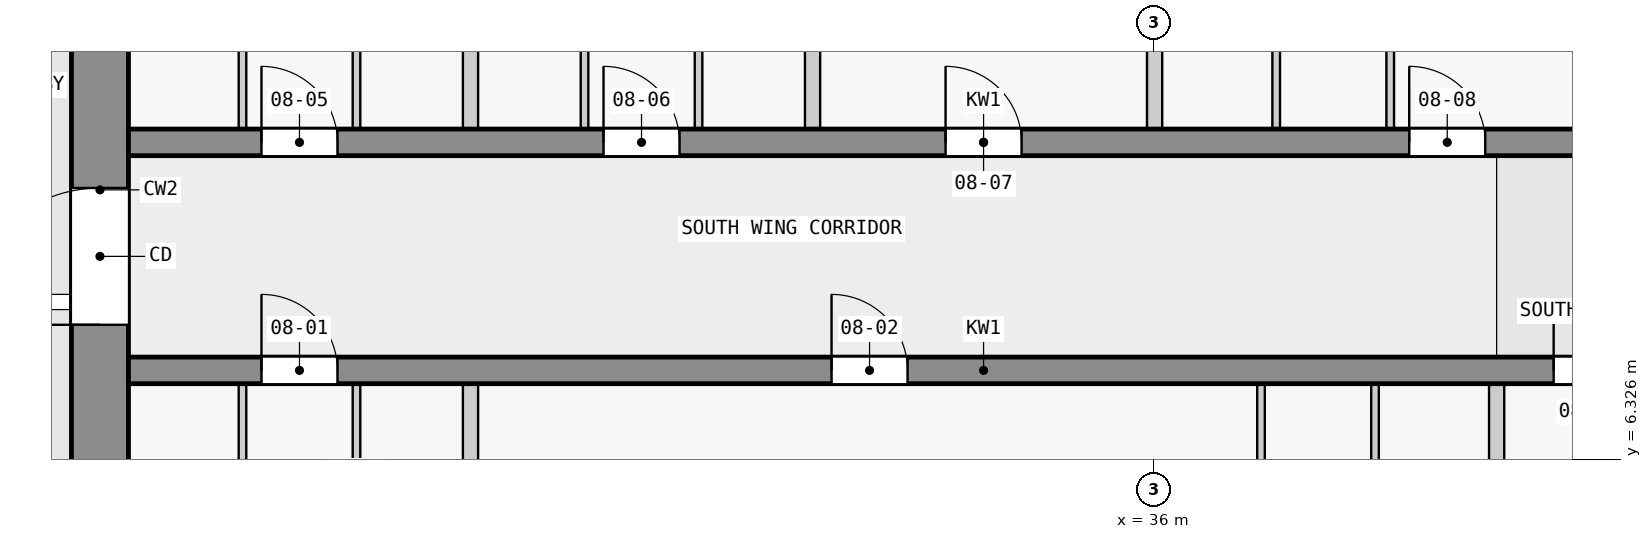
"""IFC4 building model, lengths in metres.
Left out: names, types, materials, properties, quantities, classifications, styles, units other than length and angle.
Written with IfcOpenShell. Run it as: python <this file> out.ifc"""

import sys

from ifc_helpers import new_model, si_unit, direction, frame, frame_2d, origin, place, context, subcontext, project, spatial, rectangle, extrude, element, fill, save


model = new_model("IFC4")
c1 = context("Model", 3, precision=1e-05, world=origin(), true_north=direction((0.0, 1.0)))
c2 = subcontext(c1, "Body", "Model", "MODEL_VIEW")
j1 = project(units=[si_unit("LENGTHUNIT", "METRE"), si_unit("PLANEANGLEUNIT", "RADIAN")], contexts=[c1])
p1 = place(None, origin())
s1 = spatial("IfcSite", under=j1, at=p1, CompositionType="ELEMENT")
p2 = place(p1, origin())
s2 = spatial("IfcBuilding", under=s1, at=p2, CompositionType="ELEMENT")
p3 = place(p2, frame((0.0, 0.0, 37.3)))
s3 = spatial("IfcBuildingStorey", under=s2, at=p3, CompositionType="ELEMENT", Elevation=37.3)
p4 = place(p3, frame((22.125, 2.5, 0.0), z_axis=(0.0, 0.0, 1.0), x_axis=(0.0, 1.0, 0.0)))
e1 = element("IfcWall", 1, at=p4, inside=s3, PredefinedType="SHEAR", context=c2, shape_type="SweptSolid", body=[
    extrude(rectangle(XDim=14.75, YDim=0.75, at=frame_2d((7.375, 0.0))), origin(), (0.0, 0.0, 1.0), 3.25),
])
p5 = place(p4, frame((5.6, 0.0, 0.0)))
e2 = element("IfcOpeningElement", 2, at=p5, cuts=e1, PredefinedType="OPENING", context=c2, shape_type="SweptSolid", body=[
    extrude(rectangle(XDim=1.8, YDim=2.1, at=frame_2d((0.9, 1.05))), frame((0.0, 0.385, 0.0), z_axis=(0.0, -1.0, 0.0), x_axis=(1.0, 0.0, 0.0)), (0.0, 0.0, 1.0), 0.77),
])
p6 = place(p3, frame((22.5, 7.5, 0.0), z_axis=(0.0, 0.0, 1.0), x_axis=(1.0, 0.0, 0.0)))
e3 = element("IfcWall", 3, at=p6, inside=s3, PredefinedType="SHEAR", context=c2, shape_type="SweptSolid", body=[
    extrude(rectangle(XDim=22.5, YDim=0.35, at=frame_2d((11.25, 0.0))), origin(), (0.0, 0.0, 1.0), 3.25),
])
p7 = place(p6, frame((1.75, 0.0, 0.0)))
e4 = element("IfcOpeningElement", 4, at=p7, cuts=e3, PredefinedType="OPENING", context=c2, shape_type="SweptSolid", body=[
    extrude(rectangle(XDim=1.0, YDim=2.1, at=frame_2d((0.5, 1.05))), frame((0.0, 0.185, 0.0), z_axis=(0.0, -1.0, 0.0), x_axis=(1.0, 0.0, 0.0)), (0.0, 0.0, 1.0), 0.37),
])
p8 = place(p6, frame((9.25, 0.0, 0.0)))
e5 = element("IfcOpeningElement", 5, at=p8, cuts=e3, PredefinedType="OPENING", context=c2, shape_type="SweptSolid", body=[
    extrude(rectangle(XDim=1.0, YDim=2.1, at=frame_2d((0.5, 1.05))), frame((0.0, 0.185, 0.0), z_axis=(0.0, -1.0, 0.0), x_axis=(1.0, 0.0, 0.0)), (0.0, 0.0, 1.0), 0.37),
])
p9 = place(p6, frame((18.75, 0.0, 0.0)))
e6 = element("IfcOpeningElement", 6, at=p9, cuts=e3, PredefinedType="OPENING", context=c2, shape_type="SweptSolid", body=[
    extrude(rectangle(XDim=0.9, YDim=2.1, at=frame_2d((0.45, 1.05))), frame((0.0, 0.185, 0.0), z_axis=(0.0, -1.0, 0.0), x_axis=(1.0, 0.0, 0.0)), (0.0, 0.0, 1.0), 0.37),
])
p10 = place(p6, frame((20.95, 0.0, 0.0)))
e7 = element("IfcOpeningElement", 7, at=p10, cuts=e3, PredefinedType="OPENING", context=c2, shape_type="SweptSolid", body=[
    extrude(rectangle(XDim=1.0, YDim=2.1, at=frame_2d((0.5, 1.05))), frame((0.0, 0.185, 0.0), z_axis=(0.0, -1.0, 0.0), x_axis=(1.0, 0.0, 0.0)), (0.0, 0.0, 1.0), 0.37),
])
p11 = place(p3, frame((22.5, 10.5, 0.0), z_axis=(0.0, 0.0, 1.0), x_axis=(1.0, 0.0, 0.0)))
e8 = element("IfcWall", 8, at=p11, inside=s3, PredefinedType="SHEAR", context=c2, shape_type="SweptSolid", body=[
    extrude(rectangle(XDim=22.5, YDim=0.35, at=frame_2d((11.25, 0.0))), origin(), (0.0, 0.0, 1.0), 3.25),
])
p12 = place(p11, frame((1.75, 0.0, 0.0)))
e9 = element("IfcOpeningElement", 9, at=p12, cuts=e8, PredefinedType="OPENING", context=c2, shape_type="SweptSolid", body=[
    extrude(rectangle(XDim=1.0, YDim=2.1, at=frame_2d((0.5, 1.05))), frame((0.0, 0.185, 0.0), z_axis=(0.0, -1.0, 0.0), x_axis=(1.0, 0.0, 0.0)), (0.0, 0.0, 1.0), 0.37),
])
p13 = place(p11, frame((6.25, 0.0, 0.0)))
e10 = element("IfcOpeningElement", 10, at=p13, cuts=e8, PredefinedType="OPENING", context=c2, shape_type="SweptSolid", body=[
    extrude(rectangle(XDim=1.0, YDim=2.1, at=frame_2d((0.5, 1.05))), frame((0.0, 0.185, 0.0), z_axis=(0.0, -1.0, 0.0), x_axis=(1.0, 0.0, 0.0)), (0.0, 0.0, 1.0), 0.37),
])
p14 = place(p11, frame((10.75, 0.0, 0.0)))
e11 = element("IfcOpeningElement", 11, at=p14, cuts=e8, PredefinedType="OPENING", context=c2, shape_type="SweptSolid", body=[
    extrude(rectangle(XDim=1.0, YDim=2.1, at=frame_2d((0.5, 1.05))), frame((0.0, 0.185, 0.0), z_axis=(0.0, -1.0, 0.0), x_axis=(1.0, 0.0, 0.0)), (0.0, 0.0, 1.0), 0.37),
])
p15 = place(p11, frame((16.85, 0.0, 0.0)))
e12 = element("IfcOpeningElement", 12, at=p15, cuts=e8, PredefinedType="OPENING", context=c2, shape_type="SweptSolid", body=[
    extrude(rectangle(XDim=1.0, YDim=2.1, at=frame_2d((0.5, 1.05))), frame((0.0, 0.185, 0.0), z_axis=(0.0, -1.0, 0.0), x_axis=(1.0, 0.0, 0.0)), (0.0, 0.0, 1.0), 0.37),
])
p16 = place(p3, frame((24.0, 3.925, 0.0), z_axis=(0.0, 0.0, 1.0), x_axis=(0.0, 1.0, 0.0)))
e13 = element("IfcWall", 13, at=p16, inside=s3, PredefinedType="PARTITIONING", context=c2, shape_type="SweptSolid", body=[
    extrude(rectangle(XDim=3.4, YDim=0.1, at=frame_2d((1.7, 0.0))), origin(), (0.0, 0.0, 1.0), 3.25),
])
p17 = place(p16, frame((1.25, 0.0, 0.0)))
e14 = element("IfcOpeningElement", 14, at=p17, cuts=e13, PredefinedType="OPENING", context=c2, shape_type="SweptSolid", body=[
    extrude(rectangle(XDim=0.9, YDim=2.1, at=frame_2d((0.45, 1.05))), frame((0.0, 0.06, 0.0), z_axis=(0.0, -1.0, 0.0), x_axis=(1.0, 0.0, 0.0)), (0.0, 0.0, 1.0), 0.12),
])
p18 = place(p3, frame((24.0, 10.675, 0.0), z_axis=(0.0, 0.0, 1.0), x_axis=(0.0, 1.0, 0.0)))
e15 = element("IfcWall", 15, at=p18, inside=s3, PredefinedType="PARTITIONING", context=c2, shape_type="SweptSolid", body=[
    extrude(rectangle(XDim=3.4, YDim=0.1, at=frame_2d((1.7, 0.0))), origin(), (0.0, 0.0, 1.0), 3.25),
])
p19 = place(p18, frame((1.25, 0.0, 0.0)))
e16 = element("IfcOpeningElement", 16, at=p19, cuts=e15, PredefinedType="OPENING", context=c2, shape_type="SweptSolid", body=[
    extrude(rectangle(XDim=0.9, YDim=2.1, at=frame_2d((0.45, 1.05))), frame((0.0, 0.06, 0.0), z_axis=(0.0, -1.0, 0.0), x_axis=(1.0, 0.0, 0.0)), (0.0, 0.0, 1.0), 0.12),
])
p20 = place(p3, frame((25.5, 7.325, 0.0), z_axis=(0.0, 0.0, 1.0), x_axis=(0.0, -1.0, 0.0)))
e17 = element("IfcWall", 17, at=p20, inside=s3, PredefinedType="PARTITIONING", context=c2, shape_type="SweptSolid", body=[
    extrude(rectangle(XDim=3.4, YDim=0.1, at=frame_2d((1.7, 0.0))), origin(), (0.0, 0.0, 1.0), 3.25),
])
p21 = place(p20, frame((1.25, 0.0, 0.0)))
e18 = element("IfcOpeningElement", 18, at=p21, cuts=e17, PredefinedType="OPENING", context=c2, shape_type="SweptSolid", body=[
    extrude(rectangle(XDim=0.9, YDim=2.1, at=frame_2d((0.45, 1.05))), frame((0.0, 0.06, 0.0), z_axis=(0.0, -1.0, 0.0), x_axis=(1.0, 0.0, 0.0)), (0.0, 0.0, 1.0), 0.12),
])
p22 = place(p3, frame((25.5, 14.075, 0.0), z_axis=(0.0, 0.0, 1.0), x_axis=(0.0, -1.0, 0.0)))
e19 = element("IfcWall", 19, at=p22, inside=s3, PredefinedType="PARTITIONING", context=c2, shape_type="SweptSolid", body=[
    extrude(rectangle(XDim=3.4, YDim=0.1, at=frame_2d((1.7, 0.0))), origin(), (0.0, 0.0, 1.0), 3.25),
])
p23 = place(p22, frame((1.25, 0.0, 0.0)))
e20 = element("IfcOpeningElement", 20, at=p23, cuts=e19, PredefinedType="OPENING", context=c2, shape_type="SweptSolid", body=[
    extrude(rectangle(XDim=0.9, YDim=2.1, at=frame_2d((0.45, 1.05))), frame((0.0, 0.06, 0.0), z_axis=(0.0, -1.0, 0.0), x_axis=(1.0, 0.0, 0.0)), (0.0, 0.0, 1.0), 0.12),
])
for number, where, z_axis, x_axis in (
    (21, (27.0, 3.925, 0.0), (0.0, 0.0, 1.0), (0.0, 1.0, 0.0)),
    (22, (27.0, 10.675, 0.0), (0.0, 0.0, 1.0), (0.0, 1.0, 0.0)),
):
    element("IfcWall", number, at=place(p3, frame(where, z_axis=z_axis, x_axis=x_axis)), inside=s3, PredefinedType="PARTITIONING", context=c2, shape_type="SweptSolid", body=[
        extrude(rectangle(XDim=3.4, YDim=0.2, at=frame_2d((1.7, 0.0))), origin(), (0.0, 0.0, 1.0), 3.25),
    ])
p24 = place(p3, frame((28.5, 10.675, 0.0), z_axis=(0.0, 0.0, 1.0), x_axis=(0.0, 1.0, 0.0)))
e23 = element("IfcWall", 23, at=p24, inside=s3, PredefinedType="PARTITIONING", context=c2, shape_type="SweptSolid", body=[
    extrude(rectangle(XDim=3.4, YDim=0.1, at=frame_2d((1.7, 0.0))), origin(), (0.0, 0.0, 1.0), 3.25),
])
p25 = place(p24, frame((1.25, 0.0, 0.0)))
e24 = element("IfcOpeningElement", 24, at=p25, cuts=e23, PredefinedType="OPENING", context=c2, shape_type="SweptSolid", body=[
    extrude(rectangle(XDim=0.9, YDim=2.1, at=frame_2d((0.45, 1.05))), frame((0.0, 0.06, 0.0), z_axis=(0.0, -1.0, 0.0), x_axis=(1.0, 0.0, 0.0)), (0.0, 0.0, 1.0), 0.12),
])
p26 = place(p3, frame((30.0, 14.075, 0.0), z_axis=(0.0, 0.0, 1.0), x_axis=(0.0, -1.0, 0.0)))
e25 = element("IfcWall", 25, at=p26, inside=s3, PredefinedType="PARTITIONING", context=c2, shape_type="SweptSolid", body=[
    extrude(rectangle(XDim=3.4, YDim=0.1, at=frame_2d((1.7, 0.0))), origin(), (0.0, 0.0, 1.0), 3.25),
])
p27 = place(p26, frame((1.25, 0.0, 0.0)))
e26 = element("IfcOpeningElement", 26, at=p27, cuts=e25, PredefinedType="OPENING", context=c2, shape_type="SweptSolid", body=[
    extrude(rectangle(XDim=0.9, YDim=2.1, at=frame_2d((0.45, 1.05))), frame((0.0, 0.06, 0.0), z_axis=(0.0, -1.0, 0.0), x_axis=(1.0, 0.0, 0.0)), (0.0, 0.0, 1.0), 0.12),
])
p28 = place(p3, frame((31.5, 10.675, 0.0), z_axis=(0.0, 0.0, 1.0), x_axis=(0.0, 1.0, 0.0)))
e27 = element("IfcWall", 27, at=p28, inside=s3, PredefinedType="PARTITIONING", context=c2, shape_type="SweptSolid", body=[
    extrude(rectangle(XDim=3.4, YDim=0.2, at=frame_2d((1.7, 0.0))), origin(), (0.0, 0.0, 1.0), 3.25),
])
p29 = place(p3, frame((36.0, 10.675, 0.0), z_axis=(0.0, 0.0, 1.0), x_axis=(0.0, 1.0, 0.0)))
e28 = element("IfcWall", 28, at=p29, inside=s3, PredefinedType="PARTITIONING", context=c2, shape_type="SweptSolid", body=[
    extrude(rectangle(XDim=5.925, YDim=0.2, at=frame_2d((2.962, 0.0))), origin(), (0.0, 0.0, 1.0), 3.25),
])
p30 = place(p3, frame((37.4, 7.325, 0.0), z_axis=(0.0, 0.0, 1.0), x_axis=(0.0, -1.0, 0.0)))
e29 = element("IfcWall", 29, at=p30, inside=s3, PredefinedType="PARTITIONING", context=c2, shape_type="SweptSolid", body=[
    extrude(rectangle(XDim=3.4, YDim=0.1, at=frame_2d((1.7, 0.0))), origin(), (0.0, 0.0, 1.0), 3.25),
])
p31 = place(p30, frame((1.25, 0.0, 0.0)))
e30 = element("IfcOpeningElement", 30, at=p31, cuts=e29, PredefinedType="OPENING", context=c2, shape_type="SweptSolid", body=[
    extrude(rectangle(XDim=0.9, YDim=2.1, at=frame_2d((0.45, 1.05))), frame((0.0, 0.06, 0.0), z_axis=(0.0, -1.0, 0.0), x_axis=(1.0, 0.0, 0.0)), (0.0, 0.0, 1.0), 0.12),
])
for number, where, z_axis, x_axis in (
    (31, (37.6, 10.675, 0.0), (0.0, 0.0, 1.0), (0.0, 1.0, 0.0)),
    (32, (38.9, 3.925, 0.0), (0.0, 0.0, 1.0), (0.0, 1.0, 0.0)),
):
    element("IfcWall", number, at=place(p3, frame(where, z_axis=z_axis, x_axis=x_axis)), inside=s3, PredefinedType="PARTITIONING", context=c2, shape_type="SweptSolid", body=[
        extrude(rectangle(XDim=3.4, YDim=0.1, at=frame_2d((1.7, 0.0))), origin(), (0.0, 0.0, 1.0), 3.25),
    ])
p32 = place(p3, frame((39.1, 10.675, 0.0), z_axis=(0.0, 0.0, 1.0), x_axis=(0.0, 1.0, 0.0)))
e33 = element("IfcWall", 33, at=p32, inside=s3, PredefinedType="PARTITIONING", context=c2, shape_type="SweptSolid", body=[
    extrude(rectangle(XDim=3.4, YDim=0.1, at=frame_2d((1.7, 0.0))), origin(), (0.0, 0.0, 1.0), 3.25),
])
p33 = place(p32, frame((1.25, 0.0, 0.0)))
e34 = element("IfcOpeningElement", 34, at=p33, cuts=e33, PredefinedType="OPENING", context=c2, shape_type="SweptSolid", body=[
    extrude(rectangle(XDim=0.9, YDim=2.1, at=frame_2d((0.45, 1.05))), frame((0.0, 0.06, 0.0), z_axis=(0.0, -1.0, 0.0), x_axis=(1.0, 0.0, 0.0)), (0.0, 0.0, 1.0), 0.12),
])
p34 = place(p3, frame((40.5, 3.925, 0.0), z_axis=(0.0, 0.0, 1.0), x_axis=(0.0, 1.0, 0.0)))
e35 = element("IfcWall", 35, at=p34, inside=s3, PredefinedType="PARTITIONING", context=c2, shape_type="SweptSolid", body=[
    extrude(rectangle(XDim=3.4, YDim=0.2, at=frame_2d((1.7, 0.0))), origin(), (0.0, 0.0, 1.0), 3.25),
])
p35 = place(p5, origin())
e36 = element("IfcDoor", 36, at=p35, inside=s3, OperationType="DOUBLE_DOOR_SINGLE_SWING", PredefinedType="DOOR", context=c2, shape_type="SweptSolid", body=[
    extrude(rectangle(XDim=1.8, YDim=2.1, at=frame_2d((0.9, 1.05))), frame((0.0, 0.025, 0.0), z_axis=(0.0, -1.0, 0.0), x_axis=(1.0, 0.0, 0.0)), (0.0, 0.0, 1.0), 0.05),
])
fill(e2, e36)
p36 = place(p7, origin())
e37 = element("IfcDoor", 37, at=p36, inside=s3, OperationType="SINGLE_SWING_LEFT", PredefinedType="DOOR", context=c2, shape_type="SweptSolid", body=[
    extrude(rectangle(XDim=1.0, YDim=2.1, at=frame_2d((0.5, 1.05))), frame((0.0, 0.025, 0.0), z_axis=(0.0, -1.0, 0.0), x_axis=(1.0, 0.0, 0.0)), (0.0, 0.0, 1.0), 0.05),
])
fill(e4, e37)
p37 = place(p8, origin())
e38 = element("IfcDoor", 38, at=p37, inside=s3, OperationType="SINGLE_SWING_LEFT", PredefinedType="DOOR", context=c2, shape_type="SweptSolid", body=[
    extrude(rectangle(XDim=1.0, YDim=2.1, at=frame_2d((0.5, 1.05))), frame((0.0, 0.025, 0.0), z_axis=(0.0, -1.0, 0.0), x_axis=(1.0, 0.0, 0.0)), (0.0, 0.0, 1.0), 0.05),
])
fill(e5, e38)
p38 = place(p9, origin())
e39 = element("IfcDoor", 39, at=p38, inside=s3, OperationType="SINGLE_SWING_RIGHT", PredefinedType="DOOR", context=c2, shape_type="SweptSolid", body=[
    extrude(rectangle(XDim=0.9, YDim=2.1, at=frame_2d((0.45, 1.05))), frame((0.0, 0.025, 0.0), z_axis=(0.0, -1.0, 0.0), x_axis=(1.0, 0.0, 0.0)), (0.0, 0.0, 1.0), 0.05),
])
fill(e6, e39)
p39 = place(p12, origin())
e40 = element("IfcDoor", 40, at=p39, inside=s3, OperationType="SINGLE_SWING_LEFT", PredefinedType="DOOR", context=c2, shape_type="SweptSolid", body=[
    extrude(rectangle(XDim=1.0, YDim=2.1, at=frame_2d((0.5, 1.05))), frame((0.0, 0.025, 0.0), z_axis=(0.0, -1.0, 0.0), x_axis=(1.0, 0.0, 0.0)), (0.0, 0.0, 1.0), 0.05),
])
fill(e9, e40)
p40 = place(p13, origin())
e41 = element("IfcDoor", 41, at=p40, inside=s3, OperationType="SINGLE_SWING_LEFT", PredefinedType="DOOR", context=c2, shape_type="SweptSolid", body=[
    extrude(rectangle(XDim=1.0, YDim=2.1, at=frame_2d((0.5, 1.05))), frame((0.0, 0.025, 0.0), z_axis=(0.0, -1.0, 0.0), x_axis=(1.0, 0.0, 0.0)), (0.0, 0.0, 1.0), 0.05),
])
fill(e10, e41)
p41 = place(p14, origin())
e42 = element("IfcDoor", 42, at=p41, inside=s3, OperationType="SINGLE_SWING_LEFT", PredefinedType="DOOR", context=c2, shape_type="SweptSolid", body=[
    extrude(rectangle(XDim=1.0, YDim=2.1, at=frame_2d((0.5, 1.05))), frame((0.0, 0.025, 0.0), z_axis=(0.0, -1.0, 0.0), x_axis=(1.0, 0.0, 0.0)), (0.0, 0.0, 1.0), 0.05),
])
fill(e11, e42)
p42 = place(p15, origin())
e43 = element("IfcDoor", 43, at=p42, inside=s3, OperationType="SINGLE_SWING_RIGHT", PredefinedType="DOOR", context=c2, shape_type="SweptSolid", body=[
    extrude(rectangle(XDim=1.0, YDim=2.1, at=frame_2d((0.5, 1.05))), frame((0.0, 0.025, 0.0), z_axis=(0.0, -1.0, 0.0), x_axis=(1.0, 0.0, 0.0)), (0.0, 0.0, 1.0), 0.05),
])
fill(e12, e43)
save(model, sys.argv[1])
